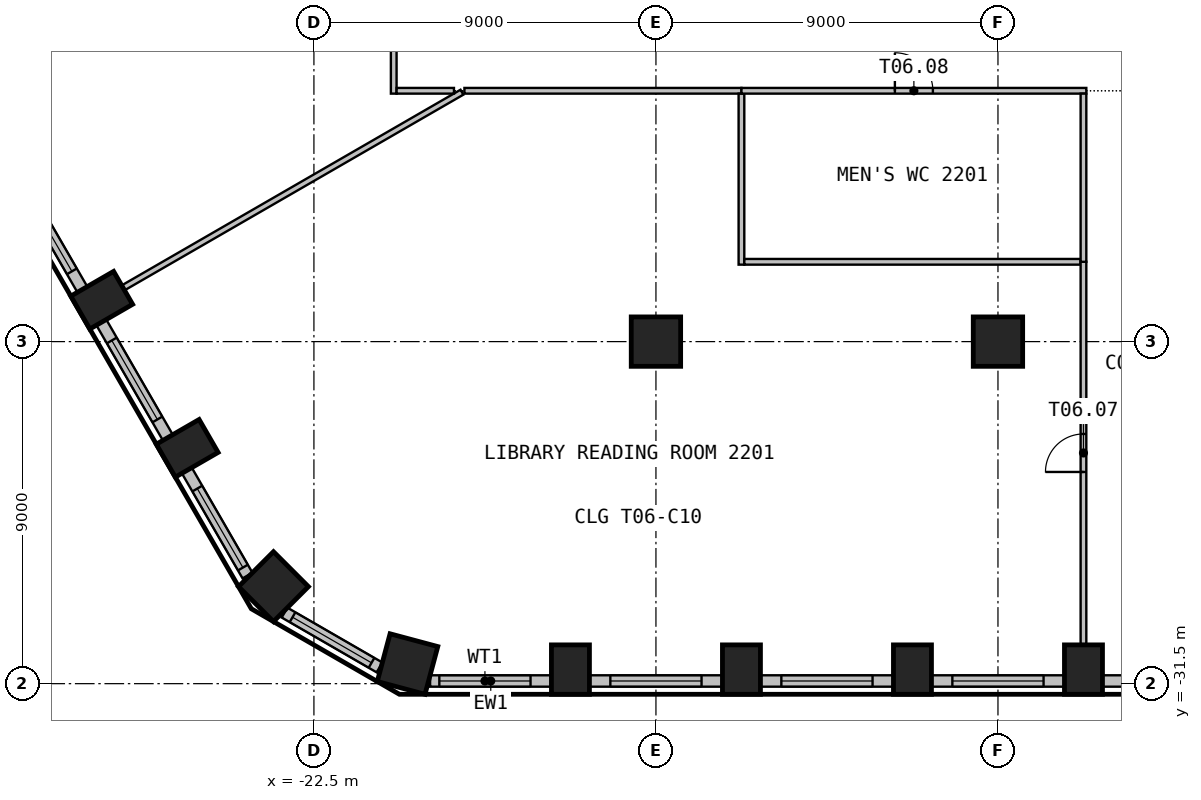
"""IFC4 building model, lengths in metres.
Left out: names, types, materials, properties, quantities, classifications, styles, units other than length and angle.
Written with IfcOpenShell. Run it as: python <this file> out.ifc"""

import sys

from ifc_helpers import new_model, si_unit, direction, frame, frame_2d, origin, origin_2d, place, context, subcontext, project, spatial, rectangle, circle, extrude, element, fill, save


model = new_model("IFC4")
c1 = context("Model", 3, precision=1e-05, world=origin(), true_north=direction((0.0, 1.0)))
c2 = subcontext(c1, "Body", "Model", "MODEL_VIEW")
j1 = project(units=[si_unit("LENGTHUNIT", "METRE"), si_unit("PLANEANGLEUNIT", "RADIAN")], contexts=[c1])
p1 = place(None, origin())
s1 = spatial("IfcSite", under=j1, at=p1, CompositionType="ELEMENT")
p2 = place(p1, origin())
s2 = spatial("IfcBuilding", under=s1, at=p2, CompositionType="ELEMENT")
p3 = place(p2, frame((0.0, 0.0, 93.0)))
s3 = spatial("IfcBuildingStorey", under=s2, at=p3, CompositionType="ELEMENT", Elevation=93.0)
p4 = place(p3, frame((-20.037, -30.984, 0.0), z_axis=(0.0, 0.0, 1.0), x_axis=(0.965925826289, -0.258819045103, 0.0)))
e1 = element("IfcColumn", 1, at=p4, inside=s3, PredefinedType="COLUMN", context=c2, shape_type="SweptSolid", body=[
    extrude(rectangle(XDim=1.3, YDim=1.3, at=origin_2d()), origin(), (0.0, 0.0, 1.0), 3.525),
])
for number, where, z_axis, x_axis in (
    (2, (-15.75, -31.13, 0.0), (0.0, 0.0, 1.0), (1.0, 0.0, 0.0)),
    (3, (-11.25, -31.13, 0.0), (0.0, 0.0, 1.0), (1.0, 0.0, 0.0)),
    (4, (-6.75, -31.13, 0.0), (0.0, 0.0, 1.0), (1.0, 0.0, 0.0)),
    (5, (-2.25, -31.13, 0.0), (0.0, 0.0, 1.0), (1.0, 0.0, 0.0)),
    (6, (-28.084, -21.411, 0.0), (0.0, 0.0, 1.0), (0.5, -0.866, 0.0)),
    (7, (-25.834, -25.308, 0.0), (0.0, 0.0, 1.0), (0.5, -0.866, 0.0)),
):
    element("IfcColumn", number, at=place(p3, frame(where, z_axis=z_axis, x_axis=x_axis)), inside=s3, PredefinedType="COLUMN", context=c2, shape_type="SweptSolid", body=[
        extrude(rectangle(XDim=1.0, YDim=1.3, at=origin_2d()), origin(), (0.0, 0.0, 1.0), 3.525),
    ])
p5 = place(p3, frame((-23.564, -28.947, 0.0), z_axis=(0.0, 0.0, 1.0), x_axis=(0.707106781187, -0.707106781187, 0.0)))
e8 = element("IfcColumn", 8, at=p5, inside=s3, PredefinedType="COLUMN", context=c2, shape_type="SweptSolid", body=[
    extrude(rectangle(XDim=1.3, YDim=1.3, at=origin_2d()), origin(), (0.0, 0.0, 1.0), 3.525),
])
for number, where, z_axis, x_axis in (
    (9, (-13.5, -22.5, 0.0), (0.0, 0.0, 1.0), (1.0, 0.0, 0.0)),
    (10, (-4.5, -22.5, 0.0), (0.0, 0.0, 1.0), (1.0, 0.0, 0.0)),
):
    element("IfcColumn", number, at=place(p3, frame(where, z_axis=z_axis, x_axis=x_axis)), inside=s3, PredefinedType="COLUMN", context=c2, shape_type="SweptSolid", body=[
        extrude(circle(Radius=0.65, at=origin_2d()), origin(), (0.0, 0.0, 1.0), 3.525),
    ])
p6 = place(p3, frame((-19.443, -31.43, 0.0), z_axis=(0.0, 0.0, 1.0), x_axis=(1.0, 0.0, 0.0)))
e11 = element("IfcWall", 11, at=p6, inside=s3, PredefinedType="SOLIDWALL", context=c2, shape_type="SweptSolid", body=[
    extrude(rectangle(XDim=3.192, YDim=0.3, at=frame_2d((1.596, 0.0))), origin(), (0.0, 0.0, 1.0), 3.525),
])
p7 = place(p6, frame((0.243, 0.0, 0.9)))
e12 = element("IfcOpeningElement", 12, at=p7, cuts=e11, PredefinedType="OPENING", context=c2, shape_type="SweptSolid", body=[
    extrude(rectangle(XDim=2.4, YDim=2.1, at=frame_2d((1.2, 1.05))), frame((0.0, 0.16, 0.0), z_axis=(0.0, -1.0, 0.0), x_axis=(1.0, 0.0, 0.0)), (0.0, 0.0, 1.0), 0.32),
])
p8 = place(p3, frame((-15.25, -31.43, 0.0), z_axis=(0.0, 0.0, 1.0), x_axis=(1.0, 0.0, 0.0)))
e13 = element("IfcWall", 13, at=p8, inside=s3, PredefinedType="SOLIDWALL", context=c2, shape_type="SweptSolid", body=[
    extrude(rectangle(XDim=3.499, YDim=0.3, at=frame_2d((1.75, 0.0))), origin(), (0.0, 0.0, 1.0), 3.525),
])
p9 = place(p8, frame((0.55, 0.0, 0.9)))
e14 = element("IfcOpeningElement", 14, at=p9, cuts=e13, PredefinedType="OPENING", context=c2, shape_type="SweptSolid", body=[
    extrude(rectangle(XDim=2.4, YDim=2.1, at=frame_2d((1.2, 1.05))), frame((0.0, 0.16, 0.0), z_axis=(0.0, -1.0, 0.0), x_axis=(1.0, 0.0, 0.0)), (0.0, 0.0, 1.0), 0.32),
])
p10 = place(p3, frame((-10.75, -31.43, 0.0), z_axis=(0.0, 0.0, 1.0), x_axis=(1.0, 0.0, 0.0)))
e15 = element("IfcWall", 15, at=p10, inside=s3, PredefinedType="SOLIDWALL", context=c2, shape_type="SweptSolid", body=[
    extrude(rectangle(XDim=3.499, YDim=0.3, at=frame_2d((1.75, 0.0))), origin(), (0.0, 0.0, 1.0), 3.525),
])
p11 = place(p10, frame((0.55, 0.0, 0.9)))
e16 = element("IfcOpeningElement", 16, at=p11, cuts=e15, PredefinedType="OPENING", context=c2, shape_type="SweptSolid", body=[
    extrude(rectangle(XDim=2.4, YDim=2.1, at=frame_2d((1.2, 1.05))), frame((0.0, 0.16, 0.0), z_axis=(0.0, -1.0, 0.0), x_axis=(1.0, 0.0, 0.0)), (0.0, 0.0, 1.0), 0.32),
])
p12 = place(p3, frame((-6.25, -31.43, 0.0), z_axis=(0.0, 0.0, 1.0), x_axis=(1.0, 0.0, 0.0)))
e17 = element("IfcWall", 17, at=p12, inside=s3, PredefinedType="SOLIDWALL", context=c2, shape_type="SweptSolid", body=[
    extrude(rectangle(XDim=3.499, YDim=0.3, at=frame_2d((1.75, 0.0))), origin(), (0.0, 0.0, 1.0), 3.525),
])
p13 = place(p12, frame((0.55, 0.0, 0.9)))
e18 = element("IfcOpeningElement", 18, at=p13, cuts=e17, PredefinedType="OPENING", context=c2, shape_type="SweptSolid", body=[
    extrude(rectangle(XDim=2.4, YDim=2.1, at=frame_2d((1.2, 1.05))), frame((0.0, 0.16, 0.0), z_axis=(0.0, -1.0, 0.0), x_axis=(1.0, 0.0, 0.0)), (0.0, 0.0, 1.0), 0.32),
])
p14 = place(p3, frame((-1.75, -31.43, 0.0), z_axis=(0.0, 0.0, 1.0), x_axis=(1.0, 0.0, 0.0)))
e19 = element("IfcWall", 19, at=p14, inside=s3, PredefinedType="SOLIDWALL", context=c2, shape_type="SweptSolid", body=[
    extrude(rectangle(XDim=3.499, YDim=0.3, at=frame_2d((1.75, 0.0))), origin(), (0.0, 0.0, 1.0), 3.525),
])
p15 = place(p14, frame((0.55, 0.0, 0.9)))
e20 = element("IfcOpeningElement", 20, at=p15, cuts=e19, PredefinedType="OPENING", context=c2, shape_type="SweptSolid", body=[
    extrude(rectangle(XDim=2.4, YDim=2.1, at=frame_2d((1.2, 1.05))), frame((0.0, 0.16, 0.0), z_axis=(0.0, -1.0, 0.0), x_axis=(1.0, 0.0, 0.0)), (0.0, 0.0, 1.0), 0.32),
])
p16 = place(p3, frame((-30.344, -18.097, 0.0), z_axis=(0.0, 0.0, 1.0), x_axis=(0.499996256241, -0.866027565234, 0.0)))
e21 = element("IfcWall", 21, at=p16, inside=s3, PredefinedType="SOLIDWALL", context=c2, shape_type="SweptSolid", body=[
    extrude(rectangle(XDim=3.499, YDim=0.3, at=frame_2d((1.75, 0.0))), origin(), (0.0, 0.0, 1.0), 3.525),
])
p17 = place(p16, frame((0.55, 0.0, 0.9)))
e22 = element("IfcOpeningElement", 22, at=p17, cuts=e21, PredefinedType="OPENING", context=c2, shape_type="SweptSolid", body=[
    extrude(rectangle(XDim=2.4, YDim=2.1, at=frame_2d((1.2, 1.05))), frame((0.0, 0.16, 0.0), z_axis=(0.0, -1.0, 0.0), x_axis=(1.0, 0.0, 0.0)), (0.0, 0.0, 1.0), 0.32),
])
p18 = place(p3, frame((-28.094, -21.994, 0.0), z_axis=(0.0, 0.0, 1.0), x_axis=(0.499996256241, -0.866027565234, 0.0)))
e23 = element("IfcWall", 23, at=p18, inside=s3, PredefinedType="SOLIDWALL", context=c2, shape_type="SweptSolid", body=[
    extrude(rectangle(XDim=3.499, YDim=0.3, at=frame_2d((1.75, 0.0))), origin(), (0.0, 0.0, 1.0), 3.525),
])
p19 = place(p18, frame((0.55, 0.0, 0.9)))
e24 = element("IfcOpeningElement", 24, at=p19, cuts=e23, PredefinedType="OPENING", context=c2, shape_type="SweptSolid", body=[
    extrude(rectangle(XDim=2.4, YDim=2.1, at=frame_2d((1.2, 1.05))), frame((0.0, 0.16, 0.0), z_axis=(0.0, -1.0, 0.0), x_axis=(1.0, 0.0, 0.0)), (0.0, 0.0, 1.0), 0.32),
])
p20 = place(p3, frame((-25.844, -25.891, 0.0), z_axis=(0.0, 0.0, 1.0), x_axis=(0.500004907028, -0.866022570692, 0.0)))
e25 = element("IfcWall", 25, at=p20, inside=s3, PredefinedType="SOLIDWALL", context=c2, shape_type="SweptSolid", body=[
    extrude(rectangle(XDim=3.192, YDim=0.3, at=frame_2d((1.596, 0.0))), origin(), (0.0, 0.0, 1.0), 3.525),
])
p21 = place(p20, frame((0.55, 0.0, 0.9)))
e26 = element("IfcOpeningElement", 26, at=p21, cuts=e25, PredefinedType="OPENING", context=c2, shape_type="SweptSolid", body=[
    extrude(rectangle(XDim=2.4, YDim=2.1, at=frame_2d((1.2, 1.05))), frame((0.0, 0.16, 0.0), z_axis=(0.0, -1.0, 0.0), x_axis=(1.0, 0.0, 0.0)), (0.0, 0.0, 1.0), 0.32),
])
p22 = place(p3, frame((-23.273, -29.63, 0.0), z_axis=(0.0, 0.0, 1.0), x_axis=(0.866053149362, -0.49995194017, 0.0)))
e27 = element("IfcWall", 27, at=p22, inside=s3, PredefinedType="SOLIDWALL", context=c2, shape_type="SweptSolid", body=[
    extrude(rectangle(XDim=2.885, YDim=0.3, at=frame_2d((1.443, 0.0))), origin(), (0.0, 0.0, 1.0), 3.525),
])
p23 = place(p22, frame((0.243, 0.0, 0.9)))
e28 = element("IfcOpeningElement", 28, at=p23, cuts=e27, PredefinedType="OPENING", context=c2, shape_type="SweptSolid", body=[
    extrude(rectangle(XDim=2.4, YDim=2.1, at=frame_2d((1.2, 1.05))), frame((0.0, 0.16, 0.0), z_axis=(0.0, -1.0, 0.0), x_axis=(1.0, 0.0, 0.0)), (0.0, 0.0, 1.0), 0.32),
])
p24 = place(p3, frame((-18.605, -15.938, 0.0), z_axis=(0.0, 0.0, 1.0), x_axis=(-0.8659928916, -0.500056308527, 0.0)))
e29 = element("IfcWall", 29, at=p24, inside=s3, PredefinedType="PARTITIONING", context=c2, shape_type="SweptSolid", body=[
    extrude(rectangle(XDim=10.276, YDim=0.15, at=frame_2d((5.138, 0.0))), origin(), (0.0, 0.0, 1.0), 3.525),
])
p25 = place(p3, frame((-20.4, -2.325, 0.0), z_axis=(0.0, 0.0, 1.0), x_axis=(0.0, -1.0, 0.0)))
e30 = element("IfcWall", 30, at=p25, inside=s3, PredefinedType="PARTITIONING", context=c2, shape_type="SweptSolid", body=[
    extrude(rectangle(XDim=13.65, YDim=0.15, at=frame_2d((6.825, 0.0))), origin(), (0.0, 0.0, 1.0), 3.525),
])
p26 = place(p25, frame((6.325, 0.0, 0.0)))
e31 = element("IfcOpeningElement", 31, at=p26, cuts=e30, PredefinedType="OPENING", context=c2, shape_type="SweptSolid", body=[
    extrude(rectangle(XDim=1.0, YDim=2.1, at=frame_2d((0.5, 1.05))), frame((0.0, 0.085, 0.0), z_axis=(0.0, -1.0, 0.0), x_axis=(1.0, 0.0, 0.0)), (0.0, 0.0, 1.0), 0.17),
])
p27 = place(p3, frame((-20.325, -15.9, 0.0), z_axis=(0.0, 0.0, 1.0), x_axis=(1.0, 0.0, 0.0)))
e32 = element("IfcWall", 32, at=p27, inside=s3, PredefinedType="PARTITIONING", context=c2, shape_type="SweptSolid", body=[
    extrude(rectangle(XDim=1.51, YDim=0.15, at=frame_2d((0.755, 0.0))), origin(), (0.0, 0.0, 1.0), 3.525),
])
p28 = place(p3, frame((-18.54, -15.9, 0.0), z_axis=(0.0, 0.0, 1.0), x_axis=(1.0, 0.0, 0.0)))
e33 = element("IfcWall", 33, at=p28, inside=s3, PredefinedType="PARTITIONING", context=c2, shape_type="SweptSolid", body=[
    extrude(rectangle(XDim=7.29, YDim=0.15, at=frame_2d((3.645, 0.0))), origin(), (0.0, 0.0, 1.0), 3.525),
])
p29 = place(p3, frame((-11.25, -15.975, 0.0), z_axis=(0.0, 0.0, 1.0), x_axis=(0.0, -1.0, 0.0)))
e34 = element("IfcWall", 34, at=p29, inside=s3, PredefinedType="PARTITIONING", context=c2, shape_type="SweptSolid", body=[
    extrude(rectangle(XDim=4.5, YDim=0.15, at=frame_2d((2.25, 0.0))), origin(), (0.0, 0.0, 1.0), 3.525),
])
p30 = place(p3, frame((-11.175, -20.4, 0.0), z_axis=(0.0, 0.0, 1.0), x_axis=(1.0, 0.0, 0.0)))
e35 = element("IfcWall", 35, at=p30, inside=s3, PredefinedType="PARTITIONING", context=c2, shape_type="SweptSolid", body=[
    extrude(rectangle(XDim=8.85, YDim=0.15, at=frame_2d((4.425, 0.0))), origin(), (0.0, 0.0, 1.0), 3.525),
])
p31 = place(p3, frame((-11.25, -15.9, 0.0), z_axis=(0.0, 0.0, 1.0), x_axis=(1.0, 0.0, 0.0)))
e36 = element("IfcWall", 36, at=p31, inside=s3, PredefinedType="PARTITIONING", context=c2, shape_type="SweptSolid", body=[
    extrude(rectangle(XDim=9.075, YDim=0.15, at=frame_2d((4.538, 0.0))), origin(), (0.0, 0.0, 1.0), 3.525),
])
p32 = place(p31, frame((4.038, 0.0, 0.0)))
e37 = element("IfcOpeningElement", 37, at=p32, cuts=e36, PredefinedType="OPENING", context=c2, shape_type="SweptSolid", body=[
    extrude(rectangle(XDim=1.0, YDim=2.1, at=frame_2d((0.5, 1.05))), frame((0.0, 0.085, 0.0), z_axis=(0.0, -1.0, 0.0), x_axis=(1.0, 0.0, 0.0)), (0.0, 0.0, 1.0), 0.17),
])
p33 = place(p3, frame((-2.25, -30.46, 0.0), z_axis=(0.0, 0.0, 1.0), x_axis=(0.0, 1.0, 0.0)))
e38 = element("IfcWall", 38, at=p33, inside=s3, PredefinedType="PARTITIONING", context=c2, shape_type="SweptSolid", body=[
    extrude(rectangle(XDim=10.06, YDim=0.15, at=frame_2d((5.03, 0.0))), origin(), (0.0, 0.0, 1.0), 3.525),
])
p34 = place(p33, frame((4.53, 0.0, 0.0)))
e39 = element("IfcOpeningElement", 39, at=p34, cuts=e38, PredefinedType="OPENING", context=c2, shape_type="SweptSolid", body=[
    extrude(rectangle(XDim=1.0, YDim=2.1, at=frame_2d((0.5, 1.05))), frame((0.0, 0.085, 0.0), z_axis=(0.0, -1.0, 0.0), x_axis=(1.0, 0.0, 0.0)), (0.0, 0.0, 1.0), 0.17),
])
p35 = place(p3, frame((-2.25, -20.4, 0.0), z_axis=(0.0, 0.0, 1.0), x_axis=(0.0, 1.0, 0.0)))
e40 = element("IfcWall", 40, at=p35, inside=s3, PredefinedType="PARTITIONING", context=c2, shape_type="SweptSolid", body=[
    extrude(rectangle(XDim=4.425, YDim=0.15, at=frame_2d((2.212, 0.0))), origin(), (0.0, 0.0, 1.0), 3.525),
])
p36 = place(p7, origin())
e41 = element("IfcWindow", 41, at=p36, inside=s3, PartitioningType="SINGLE_PANEL", PredefinedType="WINDOW", context=c2, shape_type="SweptSolid", body=[
    extrude(rectangle(XDim=2.4, YDim=2.1, at=frame_2d((1.2, 1.05))), frame((0.0, 0.03, 0.0), z_axis=(0.0, -1.0, 0.0), x_axis=(1.0, 0.0, 0.0)), (0.0, 0.0, 1.0), 0.06),
])
fill(e12, e41)
p37 = place(p9, origin())
e42 = element("IfcWindow", 42, at=p37, inside=s3, PartitioningType="SINGLE_PANEL", PredefinedType="WINDOW", context=c2, shape_type="SweptSolid", body=[
    extrude(rectangle(XDim=2.4, YDim=2.1, at=frame_2d((1.2, 1.05))), frame((0.0, 0.03, 0.0), z_axis=(0.0, -1.0, 0.0), x_axis=(1.0, 0.0, 0.0)), (0.0, 0.0, 1.0), 0.06),
])
fill(e14, e42)
p38 = place(p11, origin())
e43 = element("IfcWindow", 43, at=p38, inside=s3, PartitioningType="SINGLE_PANEL", PredefinedType="WINDOW", context=c2, shape_type="SweptSolid", body=[
    extrude(rectangle(XDim=2.4, YDim=2.1, at=frame_2d((1.2, 1.05))), frame((0.0, 0.03, 0.0), z_axis=(0.0, -1.0, 0.0), x_axis=(1.0, 0.0, 0.0)), (0.0, 0.0, 1.0), 0.06),
])
fill(e16, e43)
p39 = place(p13, origin())
e44 = element("IfcWindow", 44, at=p39, inside=s3, PartitioningType="SINGLE_PANEL", PredefinedType="WINDOW", context=c2, shape_type="SweptSolid", body=[
    extrude(rectangle(XDim=2.4, YDim=2.1, at=frame_2d((1.2, 1.05))), frame((0.0, 0.03, 0.0), z_axis=(0.0, -1.0, 0.0), x_axis=(1.0, 0.0, 0.0)), (0.0, 0.0, 1.0), 0.06),
])
fill(e18, e44)
p40 = place(p17, origin())
e45 = element("IfcWindow", 45, at=p40, inside=s3, PartitioningType="SINGLE_PANEL", PredefinedType="WINDOW", context=c2, shape_type="SweptSolid", body=[
    extrude(rectangle(XDim=2.4, YDim=2.1, at=frame_2d((1.2, 1.05))), frame((0.0, 0.03, 0.0), z_axis=(0.0, -1.0, 0.0), x_axis=(1.0, 0.0, 0.0)), (0.0, 0.0, 1.0), 0.06),
])
fill(e22, e45)
p41 = place(p19, origin())
e46 = element("IfcWindow", 46, at=p41, inside=s3, PartitioningType="SINGLE_PANEL", PredefinedType="WINDOW", context=c2, shape_type="SweptSolid", body=[
    extrude(rectangle(XDim=2.4, YDim=2.1, at=frame_2d((1.2, 1.05))), frame((0.0, 0.03, 0.0), z_axis=(0.0, -1.0, 0.0), x_axis=(1.0, 0.0, 0.0)), (0.0, 0.0, 1.0), 0.06),
])
fill(e24, e46)
p42 = place(p21, origin())
e47 = element("IfcWindow", 47, at=p42, inside=s3, PartitioningType="SINGLE_PANEL", PredefinedType="WINDOW", context=c2, shape_type="SweptSolid", body=[
    extrude(rectangle(XDim=2.4, YDim=2.1, at=frame_2d((1.2, 1.05))), frame((0.0, 0.03, 0.0), z_axis=(0.0, -1.0, 0.0), x_axis=(1.0, 0.0, 0.0)), (0.0, 0.0, 1.0), 0.06),
])
fill(e26, e47)
p43 = place(p23, origin())
e48 = element("IfcWindow", 48, at=p43, inside=s3, PartitioningType="SINGLE_PANEL", PredefinedType="WINDOW", context=c2, shape_type="SweptSolid", body=[
    extrude(rectangle(XDim=2.4, YDim=2.1, at=frame_2d((1.2, 1.05))), frame((0.0, 0.03, 0.0), z_axis=(0.0, -1.0, 0.0), x_axis=(1.0, 0.0, 0.0)), (0.0, 0.0, 1.0), 0.06),
])
fill(e28, e48)
p44 = place(p34, origin())
e49 = element("IfcDoor", 49, at=p44, inside=s3, OperationType="SINGLE_SWING_LEFT", PredefinedType="DOOR", context=c2, shape_type="SweptSolid", body=[
    extrude(rectangle(XDim=1.0, YDim=2.1, at=frame_2d((0.5, 1.05))), frame((0.0, 0.025, 0.0), z_axis=(0.0, -1.0, 0.0), x_axis=(1.0, 0.0, 0.0)), (0.0, 0.0, 1.0), 0.05),
])
fill(e39, e49)
p45 = place(p32, origin())
e50 = element("IfcDoor", 50, at=p45, inside=s3, OperationType="SINGLE_SWING_RIGHT", PredefinedType="DOOR", context=c2, shape_type="SweptSolid", body=[
    extrude(rectangle(XDim=1.0, YDim=2.1, at=frame_2d((0.5, 1.05))), frame((0.0, 0.025, 0.0), z_axis=(0.0, -1.0, 0.0), x_axis=(1.0, 0.0, 0.0)), (0.0, 0.0, 1.0), 0.05),
])
fill(e37, e50)
save(model, sys.argv[1])
